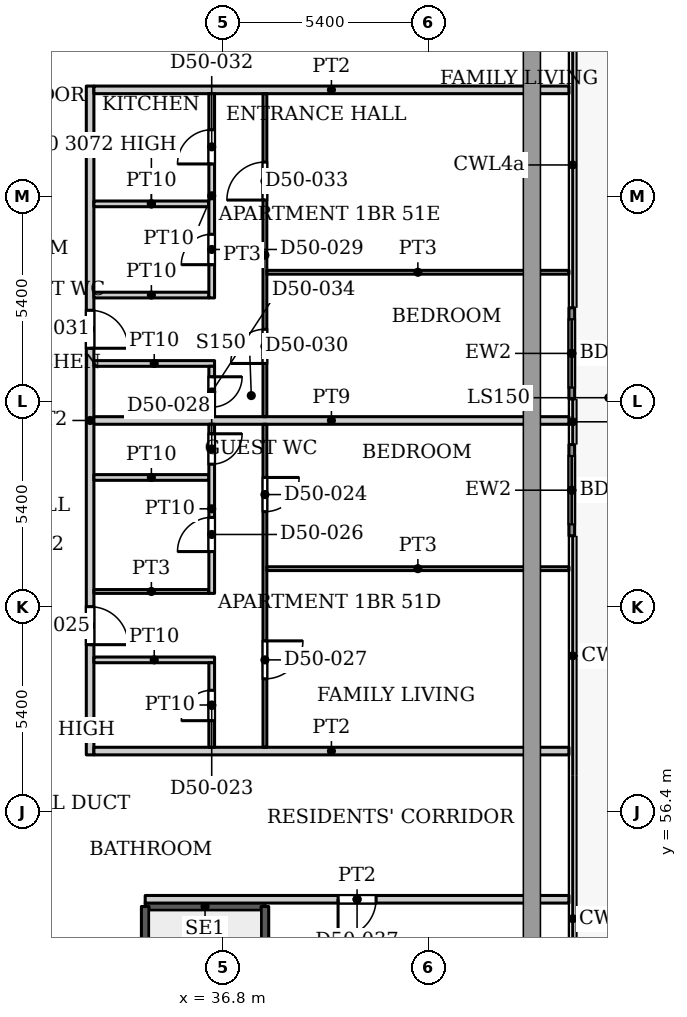
"""IFC4 building model, lengths in metres.
Left out: names, types, materials, properties, quantities, classifications, styles, units other than length and angle.
Written with IfcOpenShell. Run it as: python <this file> out.ifc"""

import sys

from ifc_helpers import new_model, si_unit, direction, frame, frame_2d, origin, place, context, subcontext, project, spatial, rectangle, extrude, source, transform, mapped, element, fill, save


model = new_model("IFC4")
c1 = context("Model", 3, precision=1e-05, world=origin(), true_north=direction((0.0, 1.0)))
c2 = subcontext(c1, "Body", "Model", "MODEL_VIEW")
j1 = project(units=[si_unit("LENGTHUNIT", "METRE"), si_unit("PLANEANGLEUNIT", "RADIAN")], contexts=[c1])
p1 = place(None, origin())
s1 = spatial("IfcSite", under=j1, at=p1, CompositionType="ELEMENT")
p2 = place(p1, origin())
s2 = spatial("IfcBuilding", under=s1, at=p2, CompositionType="ELEMENT")
p3 = place(p2, frame((0.0, 0.0, 220.1)))
s3 = spatial("IfcBuildingStorey", under=s2, at=p3, CompositionType="ELEMENT", Elevation=220.1)
p4 = place(p3, frame((45.975, 69.665, 0.0), z_axis=(0.0, 0.0, 1.0), x_axis=(0.0, -1.0, 0.0)))
e1 = element("IfcWall", 1, at=p4, inside=s3, PredefinedType="SOLIDWALL", context=c2, shape_type="SweptSolid", body=[
    extrude(rectangle(XDim=2.4, YDim=0.15, at=frame_2d((1.2, 0.0))), origin(), (0.0, 0.0, 1.0), 3.75),
])
p5 = place(p4, frame((0.3, 0.0, 0.0)))
e2 = element("IfcOpeningElement", 2, at=p5, cuts=e1, PredefinedType="OPENING", context=c2, shape_type="SweptSolid", body=[
    extrude(rectangle(XDim=1.8, YDim=2.4, at=frame_2d((0.9, 1.2))), frame((0.0, 0.085, 0.0), z_axis=(0.0, -1.0, 0.0), x_axis=(1.0, 0.0, 0.0)), (0.0, 0.0, 1.0), 0.17),
])
p6 = place(p3, frame((45.975, 66.065, 0.0), z_axis=(0.0, 0.0, 1.0), x_axis=(0.0, -1.0, 0.0)))
e3 = element("IfcWall", 3, at=p6, inside=s3, PredefinedType="SOLIDWALL", context=c2, shape_type="SweptSolid", body=[
    extrude(rectangle(XDim=2.4, YDim=0.15, at=frame_2d((1.2, 0.0))), origin(), (0.0, 0.0, 1.0), 3.75),
])
p7 = place(p6, frame((0.3, 0.0, 0.0)))
e4 = element("IfcOpeningElement", 4, at=p7, cuts=e3, PredefinedType="OPENING", context=c2, shape_type="SweptSolid", body=[
    extrude(rectangle(XDim=1.8, YDim=2.4, at=frame_2d((0.9, 1.2))), frame((0.0, 0.085, 0.0), z_axis=(0.0, -1.0, 0.0), x_axis=(1.0, 0.0, 0.0)), (0.0, 0.0, 1.0), 0.17),
])
p8 = place(p3, frame((34.75, 53.91, 0.0), z_axis=(0.0, 0.0, 1.0), x_axis=(1.0, 0.0, 0.0)))
e5 = element("IfcWall", 5, at=p8, inside=s3, PredefinedType="SHEAR", context=c2, shape_type="SweptSolid", body=[
    extrude(rectangle(XDim=3.15, YDim=0.2, at=frame_2d((1.575, 0.0))), origin(), (0.0, 0.0, 1.0), 3.9),
])
p9 = place(p3, frame((34.75, 47.5, 0.0), z_axis=(0.0, 0.0, 1.0), x_axis=(0.0, 1.0, 0.0)))
e6 = element("IfcWall", 6, at=p9, inside=s3, PredefinedType="SHEAR", context=c2, shape_type="SweptSolid", body=[
    extrude(rectangle(XDim=6.41, YDim=0.2, at=frame_2d((3.205, 0.0))), origin(), (0.0, 0.0, 1.0), 3.9),
])
p10 = place(p3, frame((37.9, 44.75, 0.0), z_axis=(0.0, 0.0, 1.0), x_axis=(0.0, 1.0, 0.0)))
e7 = element("IfcWall", 7, at=p10, inside=s3, PredefinedType="SHEAR", context=c2, shape_type="SweptSolid", body=[
    extrude(rectangle(XDim=9.16, YDim=0.2, at=frame_2d((4.58, 0.0))), origin(), (0.0, 0.0, 1.0), 3.9),
])
p11 = place(p3, frame((33.3, 57.9, 0.0), z_axis=(0.0, 0.0, 1.0), x_axis=(0.0, 1.0, 0.0)))
e8 = element("IfcWall", 8, at=p11, inside=s3, PredefinedType="PARTITIONING", context=c2, shape_type="SweptSolid", body=[
    extrude(rectangle(XDim=17.6, YDim=0.2, at=frame_2d((8.8, 0.0))), origin(), (0.0, 0.0, 1.0), 3.6),
])
p12 = place(p11, frame((2.9, 0.0, 0.0)))
e9 = element("IfcOpeningElement", 9, at=p12, cuts=e8, PredefinedType="OPENING", context=c2, shape_type="SweptSolid", body=[
    extrude(rectangle(XDim=1.0, YDim=2.1, at=frame_2d((0.5, 1.05))), frame((0.0, 0.11, 0.0), z_axis=(0.0, -1.0, 0.0), x_axis=(1.0, 0.0, 0.0)), (0.0, 0.0, 1.0), 0.22),
])
p13 = place(p11, frame((10.7, 0.0, 0.0)))
e10 = element("IfcOpeningElement", 10, at=p13, cuts=e8, PredefinedType="OPENING", context=c2, shape_type="SweptSolid", body=[
    extrude(rectangle(XDim=1.0, YDim=2.1, at=frame_2d((0.5, 1.05))), frame((0.0, 0.11, 0.0), z_axis=(0.0, -1.0, 0.0), x_axis=(1.0, 0.0, 0.0)), (0.0, 0.0, 1.0), 0.22),
])
p14 = place(p3, frame((33.4, 58.0, 0.0), z_axis=(0.0, 0.0, 1.0), x_axis=(1.0, 0.0, 0.0)))
e11 = element("IfcWall", 11, at=p14, inside=s3, PredefinedType="PARTITIONING", context=c2, shape_type="SweptSolid", body=[
    extrude(rectangle(XDim=12.5, YDim=0.2, at=frame_2d((6.25, 0.0))), origin(), (0.0, 0.0, 1.0), 3.6),
])
p15 = place(p3, frame((33.4, 60.4, 0.0), z_axis=(0.0, 0.0, 1.0), x_axis=(1.0, 0.0, 0.0)))
e12 = element("IfcWall", 12, at=p15, inside=s3, PredefinedType="PARTITIONING", context=c2, shape_type="SweptSolid", body=[
    extrude(rectangle(XDim=3.175, YDim=0.15, at=frame_2d((1.587, 0.0))), origin(), (0.0, 0.0, 1.0), 3.6),
])
p16 = place(p3, frame((33.4, 62.2, 0.0), z_axis=(0.0, 0.0, 1.0), x_axis=(1.0, 0.0, 0.0)))
e13 = element("IfcWall", 13, at=p16, inside=s3, PredefinedType="PARTITIONING", context=c2, shape_type="SweptSolid", body=[
    extrude(rectangle(XDim=3.025, YDim=0.1, at=frame_2d((1.513, 0.0))), origin(), (0.0, 0.0, 1.0), 3.6),
])
p17 = place(p3, frame((33.4, 65.2, 0.0), z_axis=(0.0, 0.0, 1.0), x_axis=(1.0, 0.0, 0.0)))
e14 = element("IfcWall", 14, at=p17, inside=s3, PredefinedType="PARTITIONING", context=c2, shape_type="SweptSolid", body=[
    extrude(rectangle(XDim=3.025, YDim=0.15, at=frame_2d((1.513, 0.0))), origin(), (0.0, 0.0, 1.0), 3.6),
])
p18 = place(p3, frame((33.4, 66.7, 0.0), z_axis=(0.0, 0.0, 1.0), x_axis=(1.0, 0.0, 0.0)))
e15 = element("IfcWall", 15, at=p18, inside=s3, PredefinedType="PARTITIONING", context=c2, shape_type="SweptSolid", body=[
    extrude(rectangle(XDim=12.5, YDim=0.2, at=frame_2d((6.25, 0.0))), origin(), (0.0, 0.0, 1.0), 3.6),
])
p19 = place(p3, frame((33.4, 68.2, 0.0), z_axis=(0.0, 0.0, 1.0), x_axis=(1.0, 0.0, 0.0)))
e16 = element("IfcWall", 16, at=p19, inside=s3, PredefinedType="PARTITIONING", context=c2, shape_type="SweptSolid", body=[
    extrude(rectangle(XDim=3.175, YDim=0.15, at=frame_2d((1.587, 0.0))), origin(), (0.0, 0.0, 1.0), 3.6),
])
p20 = place(p3, frame((33.4, 70.0, 0.0), z_axis=(0.0, 0.0, 1.0), x_axis=(1.0, 0.0, 0.0)))
e17 = element("IfcWall", 17, at=p20, inside=s3, PredefinedType="PARTITIONING", context=c2, shape_type="SweptSolid", body=[
    extrude(rectangle(XDim=3.025, YDim=0.15, at=frame_2d((1.513, 0.0))), origin(), (0.0, 0.0, 1.0), 3.6),
])
p21 = place(p3, frame((33.4, 72.4, 0.0), z_axis=(0.0, 0.0, 1.0), x_axis=(1.0, 0.0, 0.0)))
e18 = element("IfcWall", 18, at=p21, inside=s3, PredefinedType="PARTITIONING", context=c2, shape_type="SweptSolid", body=[
    extrude(rectangle(XDim=3.025, YDim=0.15, at=frame_2d((1.513, 0.0))), origin(), (0.0, 0.0, 1.0), 3.072),
])
p22 = place(p3, frame((33.4, 75.4, 0.0), z_axis=(0.0, 0.0, 1.0), x_axis=(1.0, 0.0, 0.0)))
e19 = element("IfcWall", 19, at=p22, inside=s3, PredefinedType="PARTITIONING", context=c2, shape_type="SweptSolid", body=[
    extrude(rectangle(XDim=12.5, YDim=0.2, at=frame_2d((6.25, 0.0))), origin(), (0.0, 0.0, 1.0), 3.6),
])
p23 = place(p3, frame((34.75, 54.1, 0.0), z_axis=(0.0, 0.0, 1.0), x_axis=(1.0, 0.0, 0.0)))
e20 = element("IfcWall", 20, at=p23, inside=s3, PredefinedType="PARTITIONING", context=c2, shape_type="SweptSolid", body=[
    extrude(rectangle(XDim=11.15, YDim=0.2, at=frame_2d((5.575, 0.0))), origin(), (0.0, 0.0, 1.0), 3.6),
])
p24 = place(p23, frame((5.075, 0.0, 0.0)))
e21 = element("IfcOpeningElement", 21, at=p24, cuts=e20, PredefinedType="OPENING", context=c2, shape_type="SweptSolid", body=[
    extrude(rectangle(XDim=1.0, YDim=2.1, at=frame_2d((0.5, 1.05))), frame((0.0, 0.11, 0.0), z_axis=(0.0, -1.0, 0.0), x_axis=(1.0, 0.0, 0.0)), (0.0, 0.0, 1.0), 0.22),
])
p25 = place(p3, frame((36.5, 58.1, 0.0), z_axis=(0.0, 0.0, 1.0), x_axis=(0.0, 1.0, 0.0)))
e22 = element("IfcWall", 22, at=p25, inside=s3, PredefinedType="PARTITIONING", context=c2, shape_type="SweptSolid", body=[
    extrude(rectangle(XDim=2.225, YDim=0.15, at=frame_2d((1.112, 0.0))), origin(), (0.0, 0.0, 1.0), 3.6),
])
p26 = place(p25, frame((0.7, 0.0, 0.0)))
e23 = element("IfcOpeningElement", 23, at=p26, cuts=e22, PredefinedType="OPENING", context=c2, shape_type="SweptSolid", body=[
    extrude(rectangle(XDim=0.8, YDim=2.1, at=frame_2d((0.4, 1.05))), frame((0.0, 0.085, 0.0), z_axis=(0.0, -1.0, 0.0), x_axis=(1.0, 0.0, 0.0)), (0.0, 0.0, 1.0), 0.17),
])
p27 = place(p3, frame((36.5, 62.15, 0.0), z_axis=(0.0, 0.0, 1.0), x_axis=(0.0, 1.0, 0.0)))
e24 = element("IfcWall", 24, at=p27, inside=s3, PredefinedType="PARTITIONING", context=c2, shape_type="SweptSolid", body=[
    extrude(rectangle(XDim=4.45, YDim=0.15, at=frame_2d((2.225, 0.0))), origin(), (0.0, 0.0, 1.0), 3.6),
])
p28 = place(p27, frame((1.1, 0.0, 0.0)))
e25 = element("IfcOpeningElement", 25, at=p28, cuts=e24, PredefinedType="OPENING", context=c2, shape_type="SweptSolid", body=[
    extrude(rectangle(XDim=0.9, YDim=2.1, at=frame_2d((0.45, 1.05))), frame((0.0, 0.085, 0.0), z_axis=(0.0, -1.0, 0.0), x_axis=(1.0, 0.0, 0.0)), (0.0, 0.0, 1.0), 0.17),
])
p29 = place(p27, frame((3.4, 0.0, 0.0)))
e26 = element("IfcOpeningElement", 26, at=p29, cuts=e24, PredefinedType="OPENING", context=c2, shape_type="SweptSolid", body=[
    extrude(rectangle(XDim=0.8, YDim=2.1, at=frame_2d((0.4, 1.05))), frame((0.0, 0.085, 0.0), z_axis=(0.0, -1.0, 0.0), x_axis=(1.0, 0.0, 0.0)), (0.0, 0.0, 1.0), 0.17),
])
p30 = place(p3, frame((36.5, 66.8, 0.0), z_axis=(0.0, 0.0, 1.0), x_axis=(0.0, 1.0, 0.0)))
e27 = element("IfcWall", 27, at=p30, inside=s3, PredefinedType="PARTITIONING", context=c2, shape_type="SweptSolid", body=[
    extrude(rectangle(XDim=1.325, YDim=0.15, at=frame_2d((0.663, 0.0))), origin(), (0.0, 0.0, 1.0), 3.6),
])
p31 = place(p30, frame((0.25, 0.0, 0.0)))
e28 = element("IfcOpeningElement", 28, at=p31, cuts=e27, PredefinedType="OPENING", context=c2, shape_type="SweptSolid", body=[
    extrude(rectangle(XDim=0.8, YDim=2.1, at=frame_2d((0.4, 1.05))), frame((0.0, 0.085, 0.0), z_axis=(0.0, -1.0, 0.0), x_axis=(1.0, 0.0, 0.0)), (0.0, 0.0, 1.0), 0.17),
])
p32 = place(p3, frame((36.5, 69.925, 0.0), z_axis=(0.0, 0.0, 1.0), x_axis=(0.0, 1.0, 0.0)))
e29 = element("IfcWall", 29, at=p32, inside=s3, PredefinedType="PARTITIONING", context=c2, shape_type="SweptSolid", body=[
    extrude(rectangle(XDim=5.375, YDim=0.15, at=frame_2d((2.688, 0.0))), origin(), (0.0, 0.0, 1.0), 3.6),
])
p33 = place(p32, frame((0.875, 0.0, 0.0)))
e30 = element("IfcOpeningElement", 30, at=p33, cuts=e29, PredefinedType="OPENING", context=c2, shape_type="SweptSolid", body=[
    extrude(rectangle(XDim=0.8, YDim=2.1, at=frame_2d((0.4, 1.05))), frame((0.0, 0.085, 0.0), z_axis=(0.0, -1.0, 0.0), x_axis=(1.0, 0.0, 0.0)), (0.0, 0.0, 1.0), 0.17),
])
p34 = place(p32, frame((3.525, 0.0, 0.0)))
e31 = element("IfcOpeningElement", 31, at=p34, cuts=e29, PredefinedType="OPENING", context=c2, shape_type="SweptSolid", body=[
    extrude(rectangle(XDim=0.9, YDim=2.1, at=frame_2d((0.45, 1.05))), frame((0.0, 0.085, 0.0), z_axis=(0.0, -1.0, 0.0), x_axis=(1.0, 0.0, 0.0)), (0.0, 0.0, 1.0), 0.17),
])
p35 = place(p3, frame((37.9, 58.1, 0.0), z_axis=(0.0, 0.0, 1.0), x_axis=(0.0, 1.0, 0.0)))
e32 = element("IfcWall", 32, at=p35, inside=s3, PredefinedType="PARTITIONING", context=c2, shape_type="SweptSolid", body=[
    extrude(rectangle(XDim=8.5, YDim=0.1, at=frame_2d((4.25, 0.0))), origin(), (0.0, 0.0, 1.0), 3.6),
])
p36 = place(p35, frame((6.2, 0.0, 0.0)))
e33 = element("IfcOpeningElement", 33, at=p36, cuts=e32, PredefinedType="OPENING", context=c2, shape_type="SweptSolid", body=[
    extrude(rectangle(XDim=0.9, YDim=2.1, at=frame_2d((0.45, 1.05))), frame((0.0, 0.06, 0.0), z_axis=(0.0, -1.0, 0.0), x_axis=(1.0, 0.0, 0.0)), (0.0, 0.0, 1.0), 0.12),
])
p37 = place(p35, frame((1.8, 0.0, 0.0)))
e34 = element("IfcOpeningElement", 34, at=p37, cuts=e32, PredefinedType="OPENING", context=c2, shape_type="SweptSolid", body=[
    extrude(rectangle(XDim=1.0, YDim=2.1, at=frame_2d((0.5, 1.05))), frame((0.0, 0.06, 0.0), z_axis=(0.0, -1.0, 0.0), x_axis=(1.0, 0.0, 0.0)), (0.0, 0.0, 1.0), 0.12),
])
p38 = place(p3, frame((37.9, 66.8, 0.0), z_axis=(0.0, 0.0, 1.0), x_axis=(0.0, 1.0, 0.0)))
e35 = element("IfcWall", 35, at=p38, inside=s3, PredefinedType="PARTITIONING", context=c2, shape_type="SweptSolid", body=[
    extrude(rectangle(XDim=8.5, YDim=0.1, at=frame_2d((4.25, 0.0))), origin(), (0.0, 0.0, 1.0), 3.6),
])
p39 = place(p38, frame((1.4, 0.0, 0.0)))
e36 = element("IfcOpeningElement", 36, at=p39, cuts=e35, PredefinedType="OPENING", context=c2, shape_type="SweptSolid", body=[
    extrude(rectangle(XDim=0.9, YDim=2.1, at=frame_2d((0.45, 1.05))), frame((0.0, 0.06, 0.0), z_axis=(0.0, -1.0, 0.0), x_axis=(1.0, 0.0, 0.0)), (0.0, 0.0, 1.0), 0.12),
])
p40 = place(p38, frame((5.7, 0.0, 0.0)))
e37 = element("IfcOpeningElement", 37, at=p40, cuts=e35, PredefinedType="OPENING", context=c2, shape_type="SweptSolid", body=[
    extrude(rectangle(XDim=1.0, YDim=2.1, at=frame_2d((0.5, 1.05))), frame((0.0, 0.06, 0.0), z_axis=(0.0, -1.0, 0.0), x_axis=(1.0, 0.0, 0.0)), (0.0, 0.0, 1.0), 0.12),
])
for number, where, z_axis, x_axis in (
    (38, (37.95, 62.8, 0.0), (0.0, 0.0, 1.0), (1.0, 0.0, 0.0)),
    (39, (37.95, 70.6, 0.0), (0.0, 0.0, 1.0), (1.0, 0.0, 0.0)),
):
    element("IfcWall", number, at=place(p3, frame(where, z_axis=z_axis, x_axis=x_axis)), inside=s3, PredefinedType="PARTITIONING", context=c2, shape_type="SweptSolid", body=[
        extrude(rectangle(XDim=7.95, YDim=0.1, at=frame_2d((3.975, 0.0))), origin(), (0.0, 0.0, 1.0), 3.6),
    ])
m1 = source(origin(), c2, "Body", "SweptSolid", [
    extrude(rectangle(XDim=1.8, YDim=2.4, at=frame_2d((0.9, 1.2))), frame((0.0, 0.025, 0.0), z_axis=(0.0, -1.0, 0.0), x_axis=(1.0, 0.0, 0.0)), (0.0, 0.0, 1.0), 0.05),
])
p41 = place(p5, origin())
e40 = element("IfcDoor", 40, at=p41, inside=s3, OperationType="SLIDING_TO_LEFT", PredefinedType="DOOR", context=c2, shape_type="MappedRepresentation", body=[
    mapped(m1, transform((0.0, 0.0, 0.0), x_axis=(1.0, 0.0, 0.0), y_axis=(0.0, 1.0, 0.0), z_axis=(0.0, 0.0, 1.0), scale=1.0)),
])
fill(e2, e40)
p42 = place(p7, origin())
e41 = element("IfcDoor", 41, at=p42, inside=s3, OperationType="SLIDING_TO_LEFT", PredefinedType="DOOR", context=c2, shape_type="MappedRepresentation", body=[
    mapped(m1, transform((0.0, 0.0, 0.0), x_axis=(1.0, 0.0, 0.0), y_axis=(0.0, 1.0, 0.0), z_axis=(0.0, 0.0, 1.0), scale=1.0)),
])
fill(e4, e41)
m2 = source(origin(), c2, "Body", "SweptSolid", [
    extrude(rectangle(XDim=0.8, YDim=2.1, at=frame_2d((0.4, 1.05))), frame((0.0, 0.025, 0.0), z_axis=(0.0, -1.0, 0.0), x_axis=(1.0, 0.0, 0.0)), (0.0, 0.0, 1.0), 0.05),
])
p43 = place(p26, origin())
e42 = element("IfcDoor", 42, at=p43, inside=s3, OperationType="SINGLE_SWING_LEFT", PredefinedType="DOOR", context=c2, shape_type="MappedRepresentation", body=[
    mapped(m2, transform((0.0, 0.0, 0.0), x_axis=(1.0, 0.0, 0.0), y_axis=(0.0, 1.0, 0.0), z_axis=(0.0, 0.0, 1.0), scale=1.0)),
])
fill(e23, e42)
m3 = source(origin(), c2, "Body", "SweptSolid", [
    extrude(rectangle(XDim=0.9, YDim=2.1, at=frame_2d((0.45, 1.05))), frame((0.0, 0.025, 0.0), z_axis=(0.0, -1.0, 0.0), x_axis=(1.0, 0.0, 0.0)), (0.0, 0.0, 1.0), 0.05),
])
p44 = place(p36, origin())
e43 = element("IfcDoor", 43, at=p44, inside=s3, OperationType="SINGLE_SWING_RIGHT", PredefinedType="DOOR", context=c2, shape_type="MappedRepresentation", body=[
    mapped(m3, transform((0.0, 0.0, 0.0), x_axis=(1.0, 0.0, 0.0), y_axis=(0.0, 1.0, 0.0), z_axis=(0.0, 0.0, 1.0), scale=1.0)),
])
fill(e33, e43)
m4 = source(origin(), c2, "Body", "SweptSolid", [
    extrude(rectangle(XDim=1.0, YDim=2.1, at=frame_2d((0.5, 1.05))), frame((0.0, 0.025, 0.0), z_axis=(0.0, -1.0, 0.0), x_axis=(1.0, 0.0, 0.0)), (0.0, 0.0, 1.0), 0.05),
])
p45 = place(p12, origin())
e44 = element("IfcDoor", 44, at=p45, inside=s3, OperationType="SINGLE_SWING_RIGHT", PredefinedType="DOOR", context=c2, shape_type="MappedRepresentation", body=[
    mapped(m4, transform((0.0, 0.0, 0.0), x_axis=(1.0, 0.0, 0.0), y_axis=(0.0, 1.0, 0.0), z_axis=(0.0, 0.0, 1.0), scale=1.0)),
])
fill(e9, e44)
p46 = place(p28, origin())
e45 = element("IfcDoor", 45, at=p46, inside=s3, OperationType="SINGLE_SWING_LEFT", PredefinedType="DOOR", context=c2, shape_type="MappedRepresentation", body=[
    mapped(m3, transform((0.0, 0.0, 0.0), x_axis=(1.0, 0.0, 0.0), y_axis=(0.0, 1.0, 0.0), z_axis=(0.0, 0.0, 1.0), scale=1.0)),
])
fill(e25, e45)
m5 = source(origin(), c2, "Body", "SweptSolid", [
    extrude(rectangle(XDim=1.0, YDim=2.1, at=frame_2d((0.5, 1.05))), frame((0.0, 0.025, 0.0), z_axis=(0.0, -1.0, 0.0), x_axis=(1.0, 0.0, 0.0)), (0.0, 0.0, 1.0), 0.05),
])
p47 = place(p37, origin())
e46 = element("IfcDoor", 46, at=p47, inside=s3, OperationType="SINGLE_SWING_RIGHT", PredefinedType="DOOR", context=c2, shape_type="MappedRepresentation", body=[
    mapped(m5, transform((0.0, 0.0, 0.0), x_axis=(1.0, 0.0, 0.0), y_axis=(0.0, 1.0, 0.0), z_axis=(0.0, 0.0, 1.0), scale=1.0)),
])
fill(e34, e46)
p48 = place(p29, origin())
e47 = element("IfcDoor", 47, at=p48, inside=s3, OperationType="SINGLE_SWING_RIGHT", PredefinedType="DOOR", context=c2, shape_type="MappedRepresentation", body=[
    mapped(m2, transform((0.0, 0.0, 0.0), x_axis=(1.0, 0.0, 0.0), y_axis=(0.0, 1.0, 0.0), z_axis=(0.0, 0.0, 1.0), scale=1.0)),
])
fill(e26, e47)
p49 = place(p33, origin())
e48 = element("IfcDoor", 48, at=p49, inside=s3, OperationType="SINGLE_SWING_LEFT", PredefinedType="DOOR", context=c2, shape_type="MappedRepresentation", body=[
    mapped(m2, transform((0.0, 0.0, 0.0), x_axis=(1.0, 0.0, 0.0), y_axis=(0.0, 1.0, 0.0), z_axis=(0.0, 0.0, 1.0), scale=1.0)),
])
fill(e30, e48)
p50 = place(p39, origin())
e49 = element("IfcDoor", 49, at=p50, inside=s3, OperationType="SINGLE_SWING_LEFT", PredefinedType="DOOR", context=c2, shape_type="MappedRepresentation", body=[
    mapped(m3, transform((0.0, 0.0, 0.0), x_axis=(1.0, 0.0, 0.0), y_axis=(0.0, 1.0, 0.0), z_axis=(0.0, 0.0, 1.0), scale=1.0)),
])
fill(e36, e49)
p51 = place(p13, origin())
e50 = element("IfcDoor", 50, at=p51, inside=s3, OperationType="SINGLE_SWING_RIGHT", PredefinedType="DOOR", context=c2, shape_type="MappedRepresentation", body=[
    mapped(m4, transform((0.0, 0.0, 0.0), x_axis=(1.0, 0.0, 0.0), y_axis=(0.0, 1.0, 0.0), z_axis=(0.0, 0.0, 1.0), scale=1.0)),
])
fill(e10, e50)
p52 = place(p34, origin())
e51 = element("IfcDoor", 51, at=p52, inside=s3, OperationType="SINGLE_SWING_LEFT", PredefinedType="DOOR", context=c2, shape_type="MappedRepresentation", body=[
    mapped(m3, transform((0.0, 0.0, 0.0), x_axis=(1.0, 0.0, 0.0), y_axis=(0.0, 1.0, 0.0), z_axis=(0.0, 0.0, 1.0), scale=1.0)),
])
fill(e31, e51)
p53 = place(p40, origin())
e52 = element("IfcDoor", 52, at=p53, inside=s3, OperationType="SINGLE_SWING_LEFT", PredefinedType="DOOR", context=c2, shape_type="MappedRepresentation", body=[
    mapped(m5, transform((0.0, 0.0, 0.0), x_axis=(1.0, 0.0, 0.0), y_axis=(0.0, 1.0, 0.0), z_axis=(0.0, 0.0, 1.0), scale=1.0)),
])
fill(e37, e52)
p54 = place(p31, origin())
e53 = element("IfcDoor", 53, at=p54, inside=s3, OperationType="SINGLE_SWING_RIGHT", PredefinedType="DOOR", context=c2, shape_type="MappedRepresentation", body=[
    mapped(m2, transform((0.0, 0.0, 0.0), x_axis=(1.0, 0.0, 0.0), y_axis=(0.0, 1.0, 0.0), z_axis=(0.0, 0.0, 1.0), scale=1.0)),
])
fill(e28, e53)
m6 = source(origin(), c2, "Body", "SweptSolid", [
    extrude(rectangle(XDim=1.0, YDim=2.1, at=frame_2d((0.5, 1.05))), frame((0.0, 0.025, 0.0), z_axis=(0.0, -1.0, 0.0), x_axis=(1.0, 0.0, 0.0)), (0.0, 0.0, 1.0), 0.05),
])
p55 = place(p24, origin())
e54 = element("IfcDoor", 54, at=p55, inside=s3, OperationType="SINGLE_SWING_RIGHT", PredefinedType="DOOR", context=c2, shape_type="MappedRepresentation", body=[
    mapped(m6, transform((0.0, 0.0, 0.0), x_axis=(1.0, 0.0, 0.0), y_axis=(0.0, 1.0, 0.0), z_axis=(0.0, 0.0, 1.0), scale=1.0)),
])
fill(e21, e54)
save(model, sys.argv[1])
